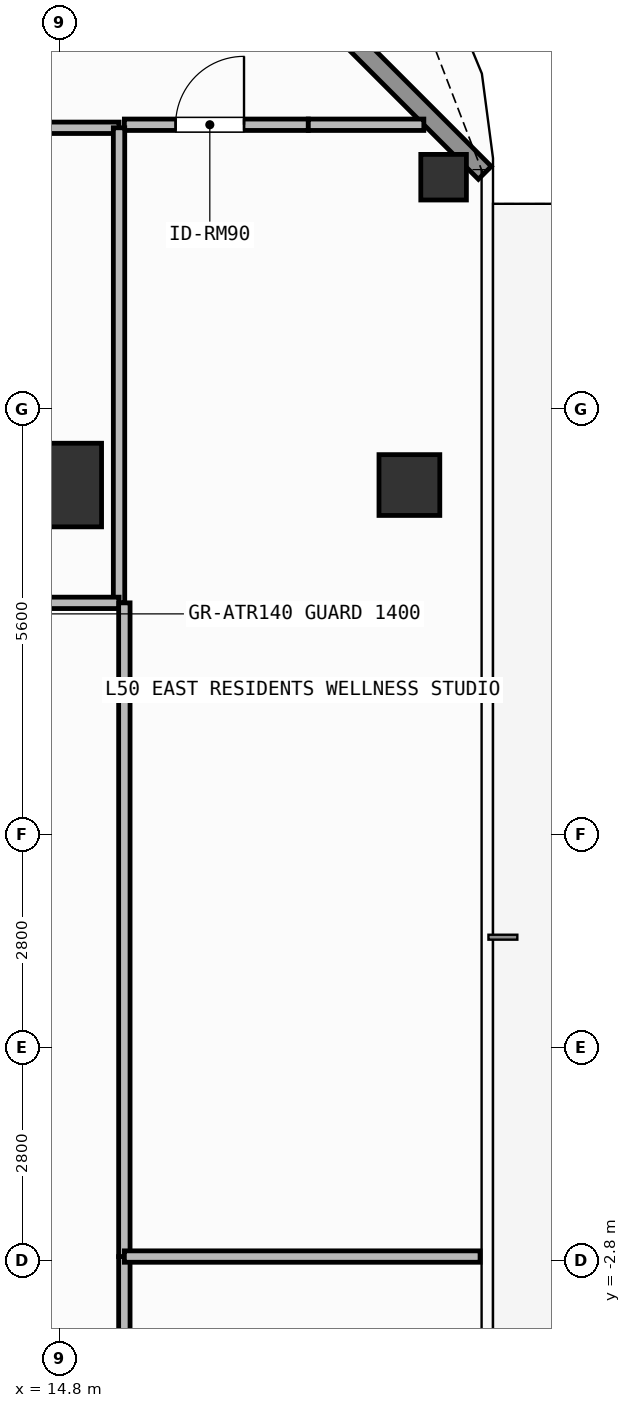
"""IFC4 building model, lengths in metres.
Left out: names, types, materials, properties, quantities, classifications, styles, units other than length and angle.
Written with IfcOpenShell. Run it as: python <this file> out.ifc"""

import sys

from ifc_helpers import new_model, si_unit, direction, frame, frame_2d, origin, origin_2d, place, context, subcontext, project, spatial, rectangle, hollow_rectangle, extrude, element, fill, save


model = new_model("IFC4")
c1 = context("Model", 3, precision=1e-05, world=origin(), true_north=direction((0.0, 1.0)))
c2 = subcontext(c1, "Body", "Model", "MODEL_VIEW")
j1 = project(units=[si_unit("LENGTHUNIT", "METRE"), si_unit("PLANEANGLEUNIT", "RADIAN")], contexts=[c1])
p1 = place(None, origin())
s1 = spatial("IfcSite", under=j1, at=p1, CompositionType="ELEMENT")
p2 = place(p1, origin())
s2 = spatial("IfcBuilding", under=s1, at=p2, CompositionType="ELEMENT")
p3 = place(p2, frame((0.0, 0.0, 203.1)))
s3 = spatial("IfcBuildingStorey", under=s2, at=p3, CompositionType="ELEMENT", Elevation=203.1)
p4 = place(p3, frame((14.8, 7.4, 0.0), z_axis=(0.0, 0.0, 1.0), x_axis=(1.0, 0.0, 0.0)))
e1 = element("IfcColumn", 1, at=p4, inside=s3, PredefinedType="COLUMN", context=c2, shape_type="SweptSolid", body=[
    extrude(rectangle(XDim=1.1, YDim=1.1, at=origin_2d()), origin(), (0.0, 0.0, 1.0), 3.9),
])
p5 = place(p3, frame((19.4, 7.4, 0.0), z_axis=(0.0, 0.0, 1.0), x_axis=(1.0, 0.0, 0.0)))
e2 = element("IfcColumn", 2, at=p5, inside=s3, PredefinedType="COLUMN", context=c2, shape_type="SweptSolid", body=[
    extrude(hollow_rectangle(XDim=0.8, YDim=0.8, WallThickness=0.036, at=origin_2d()), origin(), (0.0, 0.0, 1.0), 3.9),
])
p6 = place(p3, frame((19.85, 11.45, 0.0), z_axis=(0.0, 0.0, 1.0), x_axis=(1.0, 0.0, 0.0)))
e3 = element("IfcColumn", 3, at=p6, inside=s3, PredefinedType="COLUMN", context=c2, shape_type="SweptSolid", body=[
    extrude(hollow_rectangle(XDim=0.6, YDim=0.6, WallThickness=0.028, at=origin_2d()), origin(), (0.0, 0.0, 1.0), 3.9),
])
p7 = place(p3, frame((16.008, 15.892, 0.0), z_axis=(0.0, 0.0, 1.0), x_axis=(0.707106781187, -0.707106781187, 0.0)))
e4 = element("IfcWall", 4, at=p7, inside=s3, PredefinedType="SOLIDWALL", context=c2, shape_type="SweptSolid", body=[
    extrude(rectangle(XDim=6.201, YDim=0.24, at=frame_2d((3.101, 0.0))), origin(), (0.0, 0.0, 1.0), 3.68),
])
p8 = place(p3, frame((8.36, 12.1, 0.0), z_axis=(0.0, 0.0, 1.0), x_axis=(1.0, 0.0, 0.0)))
e5 = element("IfcWall", 5, at=p8, inside=s3, PredefinedType="PARTITIONING", context=c2, shape_type="SweptSolid", body=[
    extrude(rectangle(XDim=7.22, YDim=0.15, at=frame_2d((3.61, 0.0))), origin(), (0.0, 0.0, 1.0), 3.68),
])
p9 = place(p8, frame((3.513, 0.0, 0.0)))
e6 = element("IfcOpeningElement", 6, at=p9, cuts=e5, PredefinedType="OPENING", context=c2, shape_type="SweptSolid", body=[
    extrude(rectangle(XDim=0.9, YDim=2.1, at=frame_2d((0.45, 1.05))), frame((0.0, 0.085, 0.0), z_axis=(0.0, -1.0, 0.0), x_axis=(1.0, 0.0, 0.0)), (0.0, 0.0, 1.0), 0.17),
])
p10 = place(p3, frame((15.65, 12.14, 0.0), z_axis=(0.0, 0.0, 1.0), x_axis=(1.0, 0.0, 0.0)))
e7 = element("IfcWall", 7, at=p10, inside=s3, PredefinedType="PARTITIONING", context=c2, shape_type="SweptSolid", body=[
    extrude(rectangle(XDim=2.42, YDim=0.15, at=frame_2d((1.21, 0.0))), origin(), (0.0, 0.0, 1.0), 3.68),
])
p11 = place(p10, frame((0.674, 0.0, 0.0)))
e8 = element("IfcOpeningElement", 8, at=p11, cuts=e7, PredefinedType="OPENING", context=c2, shape_type="SweptSolid", body=[
    extrude(rectangle(XDim=0.9, YDim=2.1, at=frame_2d((0.45, 1.05))), frame((0.0, 0.085, 0.0), z_axis=(0.0, -1.0, 0.0), x_axis=(1.0, 0.0, 0.0)), (0.0, 0.0, 1.0), 0.17),
])
p12 = place(p3, frame((15.58, 5.85, 0.0), z_axis=(0.0, 0.0, 1.0), x_axis=(0.0, 1.0, 0.0)))
e9 = element("IfcWall", 9, at=p12, inside=s3, PredefinedType="PARTITIONING", context=c2, shape_type="SweptSolid", body=[
    extrude(rectangle(XDim=6.25, YDim=0.15, at=frame_2d((3.125, 0.0))), origin(), (0.0, 0.0, 1.0), 3.68),
])
p13 = place(p3, frame((8.96, 5.85, 0.0), z_axis=(0.0, 0.0, 1.0), x_axis=(1.0, 0.0, 0.0)))
e10 = element("IfcWall", 10, at=p13, inside=s3, PredefinedType="PARTITIONING", context=c2, shape_type="SweptSolid", body=[
    extrude(rectangle(XDim=6.62, YDim=0.15, at=frame_2d((3.31, 0.0))), origin(), (0.0, 0.0, 1.0), 3.68),
])
p14 = place(p3, frame((15.65, -5.85, 0.0), z_axis=(0.0, 0.0, 1.0), x_axis=(0.0, 1.0, 0.0)))
e11 = element("IfcWall", 11, at=p14, inside=s3, PredefinedType="PARTITIONING", context=c2, shape_type="SweptSolid", body=[
    extrude(rectangle(XDim=3.1, YDim=0.15, at=frame_2d((1.55, 0.0))), origin(), (0.0, 0.0, 1.0), 3.68),
])
p15 = place(p3, frame((15.65, -2.75, 0.0), z_axis=(0.0, 0.0, 1.0), x_axis=(0.0, 1.0, 0.0)))
e12 = element("IfcWall", 12, at=p15, inside=s3, PredefinedType="PARTITIONING", context=c2, shape_type="SweptSolid", body=[
    extrude(rectangle(XDim=8.6, YDim=0.15, at=frame_2d((4.3, 0.0))), origin(), (0.0, 0.0, 1.0), 3.68),
])
p16 = place(p3, frame((15.65, -2.75, 0.0), z_axis=(0.0, 0.0, 1.0), x_axis=(1.0, 0.0, 0.0)))
e13 = element("IfcWall", 13, at=p16, inside=s3, PredefinedType="PARTITIONING", context=c2, shape_type="SweptSolid", body=[
    extrude(rectangle(XDim=4.68, YDim=0.15, at=frame_2d((2.34, 0.0))), origin(), (0.0, 0.0, 1.0), 3.68),
])
p17 = place(p3, frame((18.07, 12.14, 0.0), z_axis=(0.0, 0.0, 1.0), x_axis=(1.0, 0.0, 0.0)))
e14 = element("IfcWall", 14, at=p17, inside=s3, PredefinedType="PARTITIONING", context=c2, shape_type="SweptSolid", body=[
    extrude(rectangle(XDim=1.52, YDim=0.15, at=frame_2d((0.76, 0.0))), origin(), (0.0, 0.0, 1.0), 3.68),
])
p18 = place(p11, origin())
e15 = element("IfcDoor", 15, at=p18, inside=s3, OperationType="SINGLE_SWING_RIGHT", PredefinedType="DOOR", context=c2, shape_type="SweptSolid", body=[
    extrude(rectangle(XDim=0.9, YDim=2.1, at=frame_2d((0.45, 1.05))), frame((0.0, 0.025, 0.0), z_axis=(0.0, -1.0, 0.0), x_axis=(1.0, 0.0, 0.0)), (0.0, 0.0, 1.0), 0.05),
])
fill(e8, e15)
save(model, sys.argv[1])
